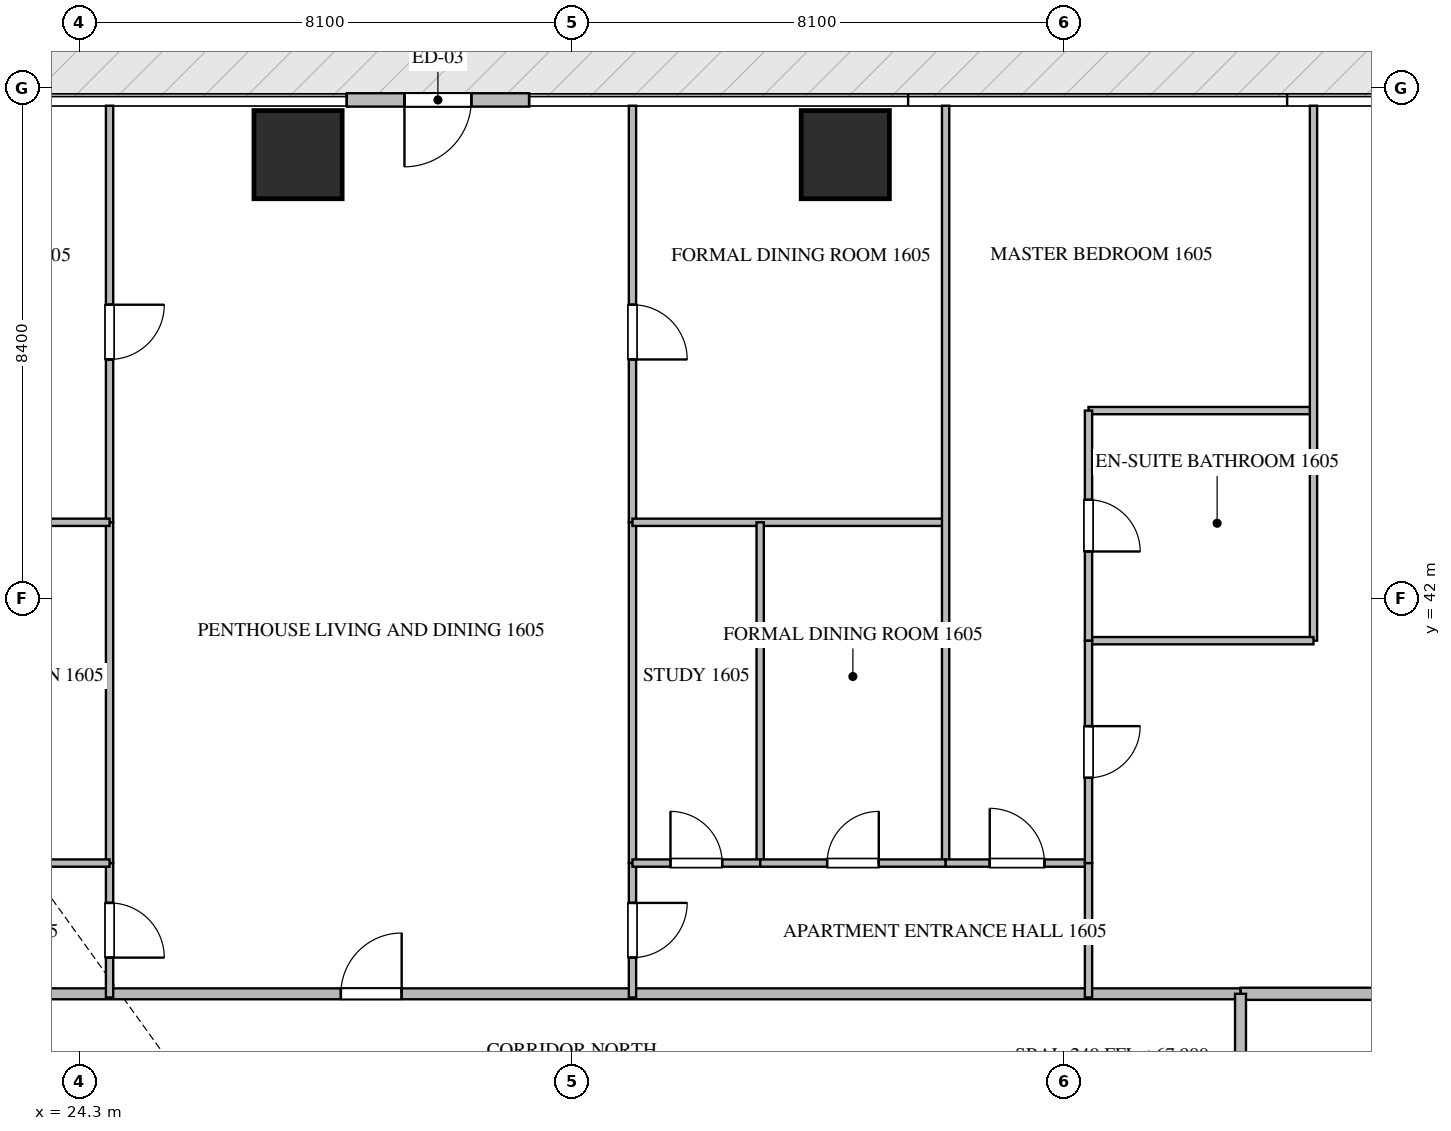
"""IFC4 building model, lengths in metres.
Left out: names, types, materials, properties, quantities, classifications, styles, units other than length and angle.
Written with IfcOpenShell. Run it as: python <this file> out.ifc"""

import sys

from ifc_helpers import new_model, si_unit, direction, frame, frame_2d, origin, origin_2d, place, context, subcontext, project, spatial, rectangle, extrude, source, transform, mapped, element, fill, save


model = new_model("IFC4")
c1 = context("Model", 3, precision=1e-05, world=origin(), true_north=direction((0.0, 1.0)))
c2 = subcontext(c1, "Body", "Model", "MODEL_VIEW")
j1 = project(units=[si_unit("LENGTHUNIT", "METRE"), si_unit("PLANEANGLEUNIT", "RADIAN")], contexts=[c1])
p1 = place(None, origin())
s1 = spatial("IfcSite", under=j1, at=p1, CompositionType="ELEMENT")
p2 = place(p1, origin())
s2 = spatial("IfcBuilding", under=s1, at=p2, CompositionType="ELEMENT")
p3 = place(p2, frame((0.0, 0.0, 67.95)))
s3 = spatial("IfcBuildingStorey", under=s2, at=p3, CompositionType="ELEMENT", Elevation=67.95)
m1 = source(origin(), c2, "Body", "SweptSolid", [
    extrude(rectangle(XDim=1.45, YDim=1.45, at=origin_2d()), origin(), (0.0, 0.0, 1.0), 3.75),
])
for number, where, z_axis, x_axis in (
    (1, (27.9, 49.3, -0.26), (0.0, 0.0, 1.0), (1.0, 0.0, 0.0)),
    (2, (36.9, 49.3, -0.26), (0.0, 0.0, 1.0), (1.0, 0.0, 0.0)),
):
    element("IfcColumn", number, at=place(p3, frame(where, z_axis=z_axis, x_axis=x_axis)), inside=s3, PredefinedType="COLUMN", context=c2, shape_type="MappedRepresentation", body=[
        mapped(m1, transform((0.0, 0.0, 0.0), scale=1.0)),
    ])
p4 = place(p3, frame((31.7, 50.2, 0.0), z_axis=(0.0, 0.0, 1.0), x_axis=(-1.0, 0.0, 0.0)))
e3 = element("IfcWall", 3, at=p4, inside=s3, PredefinedType="ELEMENTEDWALL", context=c2, shape_type="SweptSolid", body=[
    extrude(rectangle(XDim=3.0, YDim=0.22, at=frame_2d((1.5, 0.0))), origin(), (0.0, 0.0, 1.0), 3.475),
])
p5 = place(p4, frame((0.95, 0.0, 0.0)))
e4 = element("IfcOpeningElement", 4, at=p5, cuts=e3, PredefinedType="OPENING", context=c2, shape_type="SweptSolid", body=[
    extrude(rectangle(XDim=1.1, YDim=2.2, at=frame_2d((0.55, 1.1))), frame((0.0, 0.12, 0.0), z_axis=(0.0, -1.0, 0.0), x_axis=(1.0, 0.0, 0.0)), (0.0, 0.0, 1.0), 0.24),
])
p6 = place(p3, frame((43.4, 35.5, 0.0), z_axis=(0.0, 0.0, 1.0), x_axis=(1.0, 0.0, 0.0)))
e5 = element("IfcWall", 5, at=p6, inside=s3, PredefinedType="PARTITIONING", context=c2, shape_type="SweptSolid", body=[
    extrude(rectangle(XDim=15.318, YDim=0.2, at=frame_2d((7.659, 0.0))), origin(), (0.0, 0.0, 1.0), 3.49),
])
p7 = place(p3, frame((21.402, 35.5, 0.0), z_axis=(0.0, 0.0, 1.0), x_axis=(1.0, 0.0, 0.0)))
e6 = element("IfcWall", 6, at=p7, inside=s3, PredefinedType="PARTITIONING", context=c2, shape_type="SweptSolid", body=[
    extrude(rectangle(XDim=21.996, YDim=0.18, at=frame_2d((10.998, 0.0))), origin(), (0.0, 0.0, 1.0), 3.49),
])
p8 = place(p7, frame((7.202, 0.0, 0.0)))
e7 = element("IfcOpeningElement", 7, at=p8, cuts=e6, PredefinedType="OPENING", context=c2, shape_type="SweptSolid", body=[
    extrude(rectangle(XDim=1.0, YDim=2.15, at=frame_2d((0.5, 1.075))), frame((0.0, 0.1, 0.0), z_axis=(0.0, -1.0, 0.0), x_axis=(1.0, 0.0, 0.0)), (0.0, 0.0, 1.0), 0.2),
])
p9 = place(p3, frame((43.4, 14.9, 0.0), z_axis=(0.0, 0.0, 1.0), x_axis=(0.0, 1.0, 0.0)))
e8 = element("IfcWall", 8, at=p9, inside=s3, PredefinedType="PARTITIONING", context=c2, shape_type="SweptSolid", body=[
    extrude(rectangle(XDim=20.6, YDim=0.18, at=frame_2d((10.3, 0.0))), origin(), (0.0, 0.0, 1.0), 3.49),
])
p10 = place(p9, frame((3.469, 0.0, 0.0)))
e9 = element("IfcOpeningElement", 9, at=p10, cuts=e8, PredefinedType="OPENING", context=c2, shape_type="SweptSolid", body=[
    extrude(rectangle(XDim=1.0, YDim=2.15, at=frame_2d((0.5, 1.075))), frame((0.0, 0.1, 0.0), z_axis=(0.0, -1.0, 0.0), x_axis=(1.0, 0.0, 0.0)), (0.0, 0.0, 1.0), 0.2),
])
p11 = place(p9, frame((11.074, 0.0, 0.0)))
e10 = element("IfcOpeningElement", 10, at=p11, cuts=e8, PredefinedType="OPENING", context=c2, shape_type="SweptSolid", body=[
    extrude(rectangle(XDim=1.0, YDim=2.15, at=frame_2d((0.5, 1.075))), frame((0.0, 0.1, 0.0), z_axis=(0.0, -1.0, 0.0), x_axis=(1.0, 0.0, 0.0)), (0.0, 0.0, 1.0), 0.2),
])
p12 = place(p9, frame((17.78, 0.0, 0.0)))
e11 = element("IfcOpeningElement", 11, at=p12, cuts=e8, PredefinedType="OPENING", context=c2, shape_type="SweptSolid", body=[
    extrude(rectangle(XDim=1.0, YDim=2.15, at=frame_2d((0.5, 1.075))), frame((0.0, 0.1, 0.0), z_axis=(0.0, -1.0, 0.0), x_axis=(1.0, 0.0, 0.0)), (0.0, 0.0, 1.0), 0.2),
])
p13 = place(p3, frame((24.8, 37.65, 0.0), z_axis=(0.0, 0.0, 1.0), x_axis=(0.0, -1.0, 0.0)))
e12 = element("IfcWall", 12, at=p13, inside=s3, PredefinedType="PARTITIONING", context=c2, shape_type="SweptSolid", body=[
    extrude(rectangle(XDim=2.21, YDim=0.12, at=frame_2d((1.105, 0.0))), origin(), (0.0, 0.0, 1.0), 3.49),
])
p14 = place(p13, frame((0.655, 0.0, 0.0)))
e13 = element("IfcOpeningElement", 13, at=p14, cuts=e12, PredefinedType="OPENING", context=c2, shape_type="SweptSolid", body=[
    extrude(rectangle(XDim=0.9, YDim=2.1, at=frame_2d((0.45, 1.05))), frame((0.0, 0.07, 0.0), z_axis=(0.0, -1.0, 0.0), x_axis=(1.0, 0.0, 0.0)), (0.0, 0.0, 1.0), 0.14),
])
p15 = place(p3, frame((24.8, 50.105, 0.0), z_axis=(0.0, 0.0, 1.0), x_axis=(0.0, -1.0, 0.0)))
e14 = element("IfcWall", 14, at=p15, inside=s3, PredefinedType="PARTITIONING", context=c2, shape_type="SweptSolid", body=[
    extrude(rectangle(XDim=6.851, YDim=0.12, at=frame_2d((3.426, 0.0))), origin(), (0.0, 0.0, 1.0), 3.49),
])
p16 = place(p15, frame((3.273, 0.0, 0.0)))
e15 = element("IfcOpeningElement", 15, at=p16, cuts=e14, PredefinedType="OPENING", context=c2, shape_type="SweptSolid", body=[
    extrude(rectangle(XDim=0.9, YDim=2.1, at=frame_2d((0.45, 1.05))), frame((0.0, 0.07, 0.0), z_axis=(0.0, -1.0, 0.0), x_axis=(1.0, 0.0, 0.0)), (0.0, 0.0, 1.0), 0.14),
])
p17 = place(p3, frame((24.8, 43.252, 0.0), z_axis=(0.0, 0.0, 1.0), x_axis=(0.0, -1.0, 0.0)))
e16 = element("IfcWall", 16, at=p17, inside=s3, PredefinedType="PARTITIONING", context=c2, shape_type="SweptSolid", body=[
    extrude(rectangle(XDim=5.6, YDim=0.12, at=frame_2d((2.8, 0.0))), origin(), (0.0, 0.0, 1.0), 3.49),
])
p18 = place(p3, frame((19.65, 43.254, 0.0), z_axis=(0.0, 0.0, 1.0), x_axis=(1.0, 0.0, 0.0)))
e17 = element("IfcWall", 17, at=p18, inside=s3, PredefinedType="PARTITIONING", context=c2, shape_type="SweptSolid", body=[
    extrude(rectangle(XDim=5.15, YDim=0.12, at=frame_2d((2.575, 0.0))), origin(), (0.0, 0.0, 1.0), 3.49),
])
p19 = place(p3, frame((21.752, 37.65, 0.0), z_axis=(0.0, 0.0, 1.0), x_axis=(1.0, 0.0, 0.0)))
e18 = element("IfcWall", 18, at=p19, inside=s3, PredefinedType="PARTITIONING", context=c2, shape_type="SweptSolid", body=[
    extrude(rectangle(XDim=3.048, YDim=0.12, at=frame_2d((1.524, 0.0))), origin(), (0.0, 0.0, 1.0), 3.49),
])
p20 = place(p19, frame((1.099, 0.0, 0.0)))
e19 = element("IfcOpeningElement", 19, at=p20, cuts=e18, PredefinedType="OPENING", context=c2, shape_type="SweptSolid", body=[
    extrude(rectangle(XDim=0.85, YDim=2.1, at=frame_2d((0.425, 1.05))), frame((0.0, 0.07, 0.0), z_axis=(0.0, -1.0, 0.0), x_axis=(1.0, 0.0, 0.0)), (0.0, 0.0, 1.0), 0.14),
])
p21 = place(p3, frame((33.4, 37.65, 0.0), z_axis=(0.0, 0.0, 1.0), x_axis=(0.0, -1.0, 0.0)))
e20 = element("IfcWall", 20, at=p21, inside=s3, PredefinedType="PARTITIONING", context=c2, shape_type="SweptSolid", body=[
    extrude(rectangle(XDim=2.21, YDim=0.12, at=frame_2d((1.105, 0.0))), origin(), (0.0, 0.0, 1.0), 3.49),
])
p22 = place(p21, frame((0.655, 0.0, 0.0)))
e21 = element("IfcOpeningElement", 21, at=p22, cuts=e20, PredefinedType="OPENING", context=c2, shape_type="SweptSolid", body=[
    extrude(rectangle(XDim=0.9, YDim=2.1, at=frame_2d((0.45, 1.05))), frame((0.0, 0.07, 0.0), z_axis=(0.0, -1.0, 0.0), x_axis=(1.0, 0.0, 0.0)), (0.0, 0.0, 1.0), 0.14),
])
p23 = place(p3, frame((33.4, 50.105, 0.0), z_axis=(0.0, 0.0, 1.0), x_axis=(0.0, -1.0, 0.0)))
e22 = element("IfcWall", 22, at=p23, inside=s3, PredefinedType="PARTITIONING", context=c2, shape_type="SweptSolid", body=[
    extrude(rectangle(XDim=6.851, YDim=0.12, at=frame_2d((3.426, 0.0))), origin(), (0.0, 0.0, 1.0), 3.49),
])
p24 = place(p23, frame((3.273, 0.0, 0.0)))
e23 = element("IfcOpeningElement", 23, at=p24, cuts=e22, PredefinedType="OPENING", context=c2, shape_type="SweptSolid", body=[
    extrude(rectangle(XDim=0.9, YDim=2.1, at=frame_2d((0.45, 1.05))), frame((0.0, 0.07, 0.0), z_axis=(0.0, -1.0, 0.0), x_axis=(1.0, 0.0, 0.0)), (0.0, 0.0, 1.0), 0.14),
])
p25 = place(p3, frame((33.4, 43.252, 0.0), z_axis=(0.0, 0.0, 1.0), x_axis=(0.0, -1.0, 0.0)))
e24 = element("IfcWall", 24, at=p25, inside=s3, PredefinedType="PARTITIONING", context=c2, shape_type="SweptSolid", body=[
    extrude(rectangle(XDim=5.6, YDim=0.12, at=frame_2d((2.8, 0.0))), origin(), (0.0, 0.0, 1.0), 3.49),
])
p26 = place(p3, frame((33.4, 43.254, 0.0), z_axis=(0.0, 0.0, 1.0), x_axis=(1.0, 0.0, 0.0)))
e25 = element("IfcWall", 25, at=p26, inside=s3, PredefinedType="PARTITIONING", context=c2, shape_type="SweptSolid", body=[
    extrude(rectangle(XDim=5.15, YDim=0.12, at=frame_2d((2.575, 0.0))), origin(), (0.0, 0.0, 1.0), 3.49),
])
p27 = place(p3, frame((38.55, 50.105, 0.0), z_axis=(0.0, 0.0, 1.0), x_axis=(0.0, -1.0, 0.0)))
e26 = element("IfcWall", 26, at=p27, inside=s3, PredefinedType="PARTITIONING", context=c2, shape_type="SweptSolid", body=[
    extrude(rectangle(XDim=12.455, YDim=0.12, at=frame_2d((6.228, 0.0))), origin(), (0.0, 0.0, 1.0), 3.49),
])
p28 = place(p3, frame((35.5, 43.254, 0.0), z_axis=(0.0, 0.0, 1.0), x_axis=(0.0, -1.0, 0.0)))
e27 = element("IfcWall", 27, at=p28, inside=s3, PredefinedType="PARTITIONING", context=c2, shape_type="SweptSolid", body=[
    extrude(rectangle(XDim=5.604, YDim=0.12, at=frame_2d((2.802, 0.0))), origin(), (0.0, 0.0, 1.0), 3.49),
])
p29 = place(p3, frame((33.4, 37.65, 0.0), z_axis=(0.0, 0.0, 1.0), x_axis=(1.0, 0.0, 0.0)))
e28 = element("IfcWall", 28, at=p29, inside=s3, PredefinedType="PARTITIONING", context=c2, shape_type="SweptSolid", body=[
    extrude(rectangle(XDim=2.1, YDim=0.12, at=frame_2d((1.05, 0.0))), origin(), (0.0, 0.0, 1.0), 3.49),
])
p30 = place(p29, frame((0.625, 0.0, 0.0)))
e29 = element("IfcOpeningElement", 29, at=p30, cuts=e28, PredefinedType="OPENING", context=c2, shape_type="SweptSolid", body=[
    extrude(rectangle(XDim=0.85, YDim=2.1, at=frame_2d((0.425, 1.05))), frame((0.0, 0.07, 0.0), z_axis=(0.0, -1.0, 0.0), x_axis=(1.0, 0.0, 0.0)), (0.0, 0.0, 1.0), 0.14),
])
p31 = place(p3, frame((35.502, 37.65, 0.0), z_axis=(0.0, 0.0, 1.0), x_axis=(1.0, 0.0, 0.0)))
e30 = element("IfcWall", 30, at=p31, inside=s3, PredefinedType="PARTITIONING", context=c2, shape_type="SweptSolid", body=[
    extrude(rectangle(XDim=3.048, YDim=0.12, at=frame_2d((1.524, 0.0))), origin(), (0.0, 0.0, 1.0), 3.49),
])
p32 = place(p31, frame((1.099, 0.0, 0.0)))
e31 = element("IfcOpeningElement", 31, at=p32, cuts=e30, PredefinedType="OPENING", context=c2, shape_type="SweptSolid", body=[
    extrude(rectangle(XDim=0.85, YDim=2.1, at=frame_2d((0.425, 1.05))), frame((0.0, 0.07, 0.0), z_axis=(0.0, -1.0, 0.0), x_axis=(1.0, 0.0, 0.0)), (0.0, 0.0, 1.0), 0.14),
])
p33 = place(p3, frame((38.552, 37.65, 0.0), z_axis=(0.0, 0.0, 1.0), x_axis=(1.0, 0.0, 0.0)))
e32 = element("IfcWall", 32, at=p33, inside=s3, PredefinedType="PARTITIONING", context=c2, shape_type="SweptSolid", body=[
    extrude(rectangle(XDim=2.348, YDim=0.12, at=frame_2d((1.174, 0.0))), origin(), (0.0, 0.0, 1.0), 3.49),
])
p34 = place(p33, frame((0.724, 0.0, 0.0)))
e33 = element("IfcOpeningElement", 33, at=p34, cuts=e32, PredefinedType="OPENING", context=c2, shape_type="SweptSolid", body=[
    extrude(rectangle(XDim=0.9, YDim=2.1, at=frame_2d((0.45, 1.05))), frame((0.0, 0.07, 0.0), z_axis=(0.0, -1.0, 0.0), x_axis=(1.0, 0.0, 0.0)), (0.0, 0.0, 1.0), 0.14),
])
p35 = place(p3, frame((40.9, 45.091, 0.0), z_axis=(0.0, 0.0, 1.0), x_axis=(1.0, 0.0, 0.0)))
e34 = element("IfcWall", 34, at=p35, inside=s3, PredefinedType="PARTITIONING", context=c2, shape_type="SweptSolid", body=[
    extrude(rectangle(XDim=3.7, YDim=0.12, at=frame_2d((1.85, 0.0))), origin(), (0.0, 0.0, 1.0), 3.49),
])
p36 = place(p3, frame((44.6, 50.105, 0.0), z_axis=(0.0, 0.0, 1.0), x_axis=(0.0, -1.0, 0.0)))
e35 = element("IfcWall", 35, at=p36, inside=s3, PredefinedType="PARTITIONING", context=c2, shape_type="SweptSolid", body=[
    extrude(rectangle(XDim=8.798, YDim=0.12, at=frame_2d((4.399, 0.0))), origin(), (0.0, 0.0, 1.0), 3.49),
])
p37 = place(p3, frame((40.9, 41.307, 0.0), z_axis=(0.0, 0.0, 1.0), x_axis=(1.0, 0.0, 0.0)))
e36 = element("IfcWall", 36, at=p37, inside=s3, PredefinedType="PARTITIONING", context=c2, shape_type="SweptSolid", body=[
    extrude(rectangle(XDim=3.7, YDim=0.12, at=frame_2d((1.85, 0.0))), origin(), (0.0, 0.0, 1.0), 3.49),
])
p38 = place(p3, frame((40.9, 45.091, 0.0), z_axis=(0.0, 0.0, 1.0), x_axis=(0.0, -1.0, 0.0)))
e37 = element("IfcWall", 37, at=p38, inside=s3, PredefinedType="PARTITIONING", context=c2, shape_type="SweptSolid", body=[
    extrude(rectangle(XDim=3.784, YDim=0.12, at=frame_2d((1.892, 0.0))), origin(), (0.0, 0.0, 1.0), 3.49),
])
p39 = place(p38, frame((1.467, 0.0, 0.0)))
e38 = element("IfcOpeningElement", 38, at=p39, cuts=e37, PredefinedType="OPENING", context=c2, shape_type="SweptSolid", body=[
    extrude(rectangle(XDim=0.85, YDim=2.1, at=frame_2d((0.425, 1.05))), frame((0.0, 0.07, 0.0), z_axis=(0.0, -1.0, 0.0), x_axis=(1.0, 0.0, 0.0)), (0.0, 0.0, 1.0), 0.14),
])
p40 = place(p3, frame((40.9, 41.305, 0.0), z_axis=(0.0, 0.0, 1.0), x_axis=(0.0, -1.0, 0.0)))
e39 = element("IfcWall", 39, at=p40, inside=s3, PredefinedType="PARTITIONING", context=c2, shape_type="SweptSolid", body=[
    extrude(rectangle(XDim=3.655, YDim=0.12, at=frame_2d((1.828, 0.0))), origin(), (0.0, 0.0, 1.0), 3.49),
])
p41 = place(p40, frame((1.403, 0.0, 0.0)))
e40 = element("IfcOpeningElement", 40, at=p41, cuts=e39, PredefinedType="OPENING", context=c2, shape_type="SweptSolid", body=[
    extrude(rectangle(XDim=0.85, YDim=2.1, at=frame_2d((0.425, 1.05))), frame((0.0, 0.07, 0.0), z_axis=(0.0, -1.0, 0.0), x_axis=(1.0, 0.0, 0.0)), (0.0, 0.0, 1.0), 0.14),
])
p42 = place(p3, frame((40.9, 37.648, 0.0), z_axis=(0.0, 0.0, 1.0), x_axis=(0.0, -1.0, 0.0)))
e41 = element("IfcWall", 41, at=p42, inside=s3, PredefinedType="PARTITIONING", context=c2, shape_type="SweptSolid", body=[
    extrude(rectangle(XDim=2.208, YDim=0.12, at=frame_2d((1.104, 0.0))), origin(), (0.0, 0.0, 1.0), 3.49),
])
m2 = source(origin(), c2, "Body", "SweptSolid", [
    extrude(rectangle(XDim=1.1, YDim=2.2, at=frame_2d((0.55, 1.1))), frame((0.0, 0.025, 0.0), z_axis=(0.0, -1.0, 0.0), x_axis=(1.0, 0.0, 0.0)), (0.0, 0.0, 1.0), 0.05),
])
p43 = place(p5, origin())
e42 = element("IfcDoor", 42, at=p43, inside=s3, OperationType="SINGLE_SWING_RIGHT", PredefinedType="DOOR", context=c2, shape_type="MappedRepresentation", body=[
    mapped(m2, transform((0.0, 0.0, 0.0), scale=1.0)),
])
fill(e4, e42)
m3 = source(origin(), c2, "Body", "SweptSolid", [
    extrude(rectangle(XDim=1.0, YDim=2.15, at=frame_2d((0.5, 1.075))), frame((0.0, 0.025, 0.0), z_axis=(0.0, -1.0, 0.0), x_axis=(1.0, 0.0, 0.0)), (0.0, 0.0, 1.0), 0.05),
])
p44 = place(p8, origin())
e43 = element("IfcDoor", 43, at=p44, inside=s3, OperationType="SINGLE_SWING_RIGHT", PredefinedType="DOOR", context=c2, shape_type="MappedRepresentation", body=[
    mapped(m3, transform((0.0, 0.0, 0.0), scale=1.0)),
])
fill(e7, e43)
m4 = source(origin(), c2, "Body", "SweptSolid", [
    extrude(rectangle(XDim=0.9, YDim=2.1, at=frame_2d((0.45, 1.05))), frame((0.0, 0.025, 0.0), z_axis=(0.0, -1.0, 0.0), x_axis=(1.0, 0.0, 0.0)), (0.0, 0.0, 1.0), 0.05),
])
p45 = place(p14, origin())
e44 = element("IfcDoor", 44, at=p45, inside=s3, OperationType="SINGLE_SWING_RIGHT", PredefinedType="DOOR", context=c2, shape_type="MappedRepresentation", body=[
    mapped(m4, transform((0.0, 0.0, 0.0), scale=1.0)),
])
fill(e13, e44)
p46 = place(p16, origin())
e45 = element("IfcDoor", 45, at=p46, inside=s3, OperationType="SINGLE_SWING_LEFT", PredefinedType="DOOR", context=c2, shape_type="MappedRepresentation", body=[
    mapped(m4, transform((0.0, 0.0, 0.0), scale=1.0)),
])
fill(e15, e45)
p47 = place(p22, origin())
e46 = element("IfcDoor", 46, at=p47, inside=s3, OperationType="SINGLE_SWING_LEFT", PredefinedType="DOOR", context=c2, shape_type="MappedRepresentation", body=[
    mapped(m4, transform((0.0, 0.0, 0.0), scale=1.0)),
])
fill(e21, e46)
p48 = place(p24, origin())
e47 = element("IfcDoor", 47, at=p48, inside=s3, OperationType="SINGLE_SWING_RIGHT", PredefinedType="DOOR", context=c2, shape_type="MappedRepresentation", body=[
    mapped(m4, transform((0.0, 0.0, 0.0), scale=1.0)),
])
fill(e23, e47)
m5 = source(origin(), c2, "Body", "SweptSolid", [
    extrude(rectangle(XDim=0.85, YDim=2.1, at=frame_2d((0.425, 1.05))), frame((0.0, 0.025, 0.0), z_axis=(0.0, -1.0, 0.0), x_axis=(1.0, 0.0, 0.0)), (0.0, 0.0, 1.0), 0.05),
])
p49 = place(p30, origin())
e48 = element("IfcDoor", 48, at=p49, inside=s3, OperationType="SINGLE_SWING_LEFT", PredefinedType="DOOR", context=c2, shape_type="MappedRepresentation", body=[
    mapped(m5, transform((0.0, 0.0, 0.0), scale=1.0)),
])
fill(e29, e48)
p50 = place(p32, origin())
e49 = element("IfcDoor", 49, at=p50, inside=s3, OperationType="SINGLE_SWING_RIGHT", PredefinedType="DOOR", context=c2, shape_type="MappedRepresentation", body=[
    mapped(m5, transform((0.0, 0.0, 0.0), scale=1.0)),
])
fill(e31, e49)
p51 = place(p34, origin())
e50 = element("IfcDoor", 50, at=p51, inside=s3, OperationType="SINGLE_SWING_LEFT", PredefinedType="DOOR", context=c2, shape_type="MappedRepresentation", body=[
    mapped(m4, transform((0.0, 0.0, 0.0), scale=1.0)),
])
fill(e33, e50)
p52 = place(p39, origin())
e51 = element("IfcDoor", 51, at=p52, inside=s3, OperationType="SINGLE_SWING_RIGHT", PredefinedType="DOOR", context=c2, shape_type="MappedRepresentation", body=[
    mapped(m5, transform((0.0, 0.0, 0.0), scale=1.0)),
])
fill(e38, e51)
p53 = place(p41, origin())
e52 = element("IfcDoor", 52, at=p53, inside=s3, OperationType="SINGLE_SWING_LEFT", PredefinedType="DOOR", context=c2, shape_type="MappedRepresentation", body=[
    mapped(m5, transform((0.0, 0.0, 0.0), scale=1.0)),
])
fill(e40, e52)
save(model, sys.argv[1])
